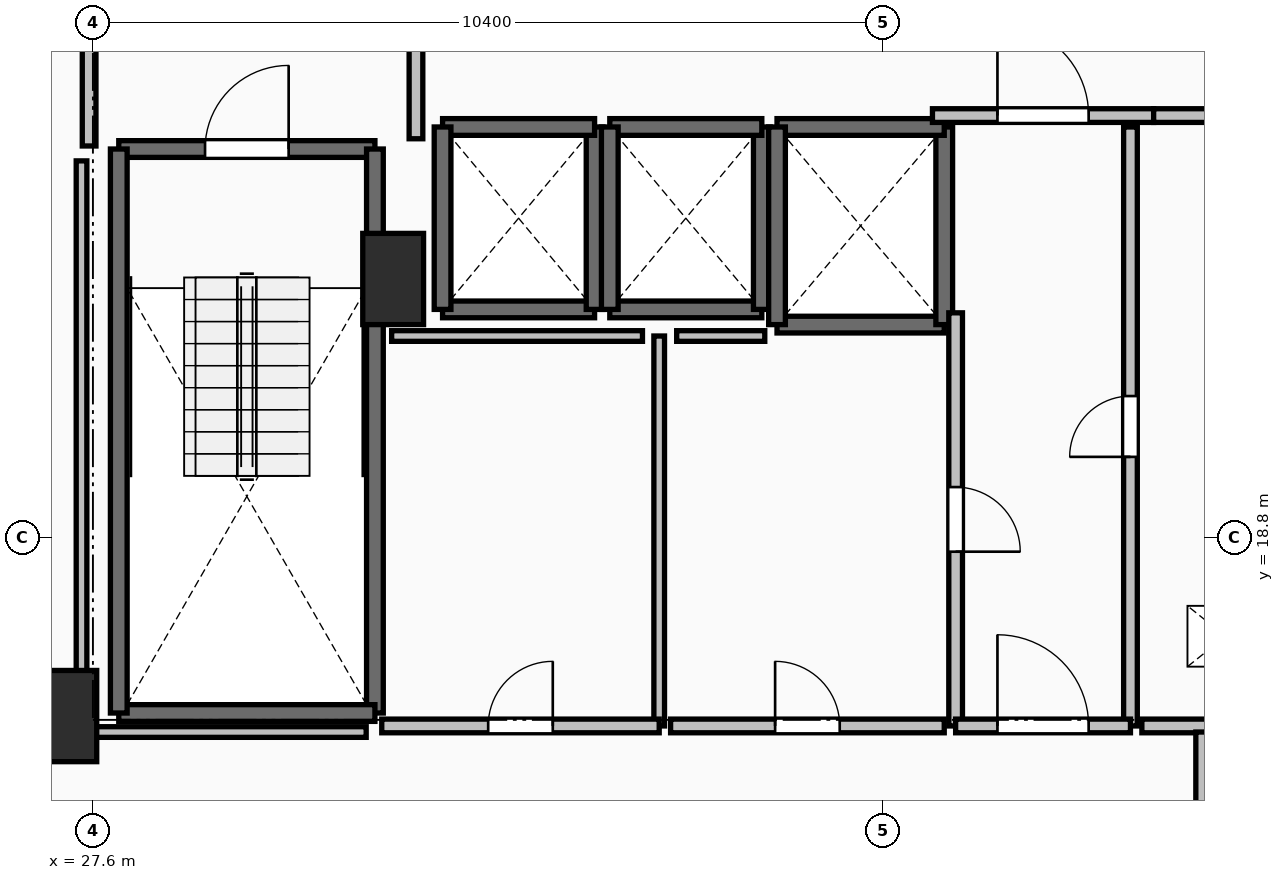
"""IFC4 building model, lengths in metres.
Left out: names, types, materials, properties, quantities, classifications, styles, units other than length and angle.
Written with IfcOpenShell. Run it as: python <this file> out.ifc"""

import sys

from ifc_helpers import new_model, si_unit, direction, frame, frame_2d, origin, origin_2d, place, context, subcontext, project, spatial, rectangle, extrude, element, fill, save


model = new_model("IFC4")
c1 = context("Model", 3, precision=1e-05, world=origin(), true_north=direction((0.0, 1.0)))
c2 = subcontext(c1, "Body", "Model", "MODEL_VIEW")
j1 = project(units=[si_unit("LENGTHUNIT", "METRE"), si_unit("PLANEANGLEUNIT", "RADIAN")], contexts=[c1])
p1 = place(None, origin())
s1 = spatial("IfcSite", under=j1, at=p1, CompositionType="ELEMENT")
p2 = place(p1, origin())
s2 = spatial("IfcBuilding", under=s1, at=p2, CompositionType="ELEMENT")
p3 = place(p2, frame((0.0, 0.0, 55.5)))
s3 = spatial("IfcBuildingStorey", under=s2, at=p3, CompositionType="ELEMENT", Elevation=55.5)
for number, where, z_axis, x_axis in (
    (1, (27.25, 16.45, 0.0), (0.0, 0.0, 1.0), (1.0, 0.0, 0.0)),
    (2, (31.55, 22.2, 0.0), (0.0, 0.0, 1.0), (1.0, 0.0, 0.0)),
):
    element("IfcColumn", number, at=place(p3, frame(where, z_axis=z_axis, x_axis=x_axis)), inside=s3, PredefinedType="PILASTER", context=c2, shape_type="SweptSolid", body=[
        extrude(rectangle(XDim=0.8, YDim=1.2, at=origin_2d()), origin(), (0.0, 0.0, 1.0), 3.5),
    ])
p4 = place(p3, frame((27.94, 23.91, 0.0), z_axis=(0.0, 0.0, 1.0), x_axis=(1.0, 0.0, 0.0)))
e3 = element("IfcWall", 3, at=p4, inside=s3, PredefinedType="SOLIDWALL", context=c2, shape_type="SweptSolid", body=[
    extrude(rectangle(XDim=3.37, YDim=0.22, at=frame_2d((1.685, 0.0))), origin(), (0.0, 0.0, 1.0), 3.24),
])
p5 = place(p4, frame((1.135, 0.0, 0.0)))
e4 = element("IfcOpeningElement", 4, at=p5, cuts=e3, PredefinedType="OPENING", context=c2, shape_type="SweptSolid", body=[
    extrude(rectangle(XDim=1.1, YDim=2.15, at=frame_2d((0.55, 1.075))), frame((0.0, 0.125, 0.0), z_axis=(0.0, -1.0, 0.0), x_axis=(1.0, 0.0, 0.0)), (0.0, 0.0, 1.0), 0.25),
])
p6 = place(p3, frame((31.31, 23.91, 0.0), z_axis=(0.0, 0.0, 1.0), x_axis=(0.0, -1.0, 0.0)))
e5 = element("IfcWall", 5, at=p6, inside=s3, PredefinedType="SOLIDWALL", context=c2, shape_type="SweptSolid", body=[
    extrude(rectangle(XDim=7.42, YDim=0.22, at=frame_2d((3.71, 0.0))), origin(), (0.0, 0.0, 1.0), 3.24),
])
p7 = place(p3, frame((31.31, 16.49, 0.0), z_axis=(0.0, 0.0, 1.0), x_axis=(-1.0, 0.0, 0.0)))
e6 = element("IfcWall", 6, at=p7, inside=s3, PredefinedType="SOLIDWALL", context=c2, shape_type="SweptSolid", body=[
    extrude(rectangle(XDim=3.37, YDim=0.22, at=frame_2d((1.685, 0.0))), origin(), (0.0, 0.0, 1.0), 3.24),
])
p8 = place(p3, frame((27.94, 16.49, 0.0), z_axis=(0.0, 0.0, 1.0), x_axis=(0.0, 1.0, 0.0)))
e7 = element("IfcWall", 7, at=p8, inside=s3, PredefinedType="SOLIDWALL", context=c2, shape_type="SweptSolid", body=[
    extrude(rectangle(XDim=7.42, YDim=0.22, at=frame_2d((3.71, 0.0))), origin(), (0.0, 0.0, 1.0), 3.24),
])
p9 = place(p3, frame((32.2, 21.8, 0.0), z_axis=(0.0, 0.0, 1.0), x_axis=(1.0, 0.0, 0.0)))
e8 = element("IfcWall", 8, at=p9, inside=s3, PredefinedType="SOLIDWALL", context=c2, shape_type="SweptSolid", body=[
    extrude(rectangle(XDim=2.0, YDim=0.22, at=frame_2d((1.0, 0.0))), origin(), (0.0, 0.0, 1.0), 3.24),
])
p10 = place(p3, frame((34.2, 21.8, 0.0), z_axis=(0.0, 0.0, 1.0), x_axis=(0.0, 1.0, 0.0)))
e9 = element("IfcWall", 9, at=p10, inside=s3, PredefinedType="SOLIDWALL", context=c2, shape_type="SweptSolid", body=[
    extrude(rectangle(XDim=2.4, YDim=0.22, at=frame_2d((1.2, 0.0))), origin(), (0.0, 0.0, 1.0), 3.24),
])
p11 = place(p3, frame((34.2, 24.2, 0.0), z_axis=(0.0, 0.0, 1.0), x_axis=(-1.0, 0.0, 0.0)))
e10 = element("IfcWall", 10, at=p11, inside=s3, PredefinedType="SOLIDWALL", context=c2, shape_type="SweptSolid", body=[
    extrude(rectangle(XDim=2.0, YDim=0.22, at=frame_2d((1.0, 0.0))), origin(), (0.0, 0.0, 1.0), 3.24),
])
p12 = place(p3, frame((32.2, 24.2, 0.0), z_axis=(0.0, 0.0, 1.0), x_axis=(0.0, -1.0, 0.0)))
e11 = element("IfcWall", 11, at=p12, inside=s3, PredefinedType="SOLIDWALL", context=c2, shape_type="SweptSolid", body=[
    extrude(rectangle(XDim=2.4, YDim=0.22, at=frame_2d((1.2, 0.0))), origin(), (0.0, 0.0, 1.0), 3.24),
])
p13 = place(p3, frame((34.4, 21.8, 0.0), z_axis=(0.0, 0.0, 1.0), x_axis=(1.0, 0.0, 0.0)))
e12 = element("IfcWall", 12, at=p13, inside=s3, PredefinedType="SOLIDWALL", context=c2, shape_type="SweptSolid", body=[
    extrude(rectangle(XDim=2.0, YDim=0.22, at=frame_2d((1.0, 0.0))), origin(), (0.0, 0.0, 1.0), 3.24),
])
p14 = place(p3, frame((36.4, 21.8, 0.0), z_axis=(0.0, 0.0, 1.0), x_axis=(0.0, 1.0, 0.0)))
e13 = element("IfcWall", 13, at=p14, inside=s3, PredefinedType="SOLIDWALL", context=c2, shape_type="SweptSolid", body=[
    extrude(rectangle(XDim=2.4, YDim=0.22, at=frame_2d((1.2, 0.0))), origin(), (0.0, 0.0, 1.0), 3.24),
])
p15 = place(p3, frame((36.4, 24.2, 0.0), z_axis=(0.0, 0.0, 1.0), x_axis=(-1.0, 0.0, 0.0)))
e14 = element("IfcWall", 14, at=p15, inside=s3, PredefinedType="SOLIDWALL", context=c2, shape_type="SweptSolid", body=[
    extrude(rectangle(XDim=2.0, YDim=0.22, at=frame_2d((1.0, 0.0))), origin(), (0.0, 0.0, 1.0), 3.24),
])
p16 = place(p3, frame((34.4, 24.2, 0.0), z_axis=(0.0, 0.0, 1.0), x_axis=(0.0, -1.0, 0.0)))
e15 = element("IfcWall", 15, at=p16, inside=s3, PredefinedType="SOLIDWALL", context=c2, shape_type="SweptSolid", body=[
    extrude(rectangle(XDim=2.4, YDim=0.22, at=frame_2d((1.2, 0.0))), origin(), (0.0, 0.0, 1.0), 3.24),
])
p17 = place(p3, frame((36.6, 21.6, 0.0), z_axis=(0.0, 0.0, 1.0), x_axis=(1.0, 0.0, 0.0)))
e16 = element("IfcWall", 16, at=p17, inside=s3, PredefinedType="SOLIDWALL", context=c2, shape_type="SweptSolid", body=[
    extrude(rectangle(XDim=2.2, YDim=0.22, at=frame_2d((1.1, 0.0))), origin(), (0.0, 0.0, 1.0), 3.24),
])
p18 = place(p3, frame((38.8, 21.6, 0.0), z_axis=(0.0, 0.0, 1.0), x_axis=(0.0, 1.0, 0.0)))
e17 = element("IfcWall", 17, at=p18, inside=s3, PredefinedType="SOLIDWALL", context=c2, shape_type="SweptSolid", body=[
    extrude(rectangle(XDim=2.6, YDim=0.22, at=frame_2d((1.3, 0.0))), origin(), (0.0, 0.0, 1.0), 3.24),
])
p19 = place(p3, frame((38.8, 24.2, 0.0), z_axis=(0.0, 0.0, 1.0), x_axis=(-1.0, 0.0, 0.0)))
e18 = element("IfcWall", 18, at=p19, inside=s3, PredefinedType="SOLIDWALL", context=c2, shape_type="SweptSolid", body=[
    extrude(rectangle(XDim=2.2, YDim=0.22, at=frame_2d((1.1, 0.0))), origin(), (0.0, 0.0, 1.0), 3.24),
])
p20 = place(p3, frame((36.6, 24.2, 0.0), z_axis=(0.0, 0.0, 1.0), x_axis=(0.0, -1.0, 0.0)))
e19 = element("IfcWall", 19, at=p20, inside=s3, PredefinedType="SOLIDWALL", context=c2, shape_type="SweptSolid", body=[
    extrude(rectangle(XDim=2.6, YDim=0.22, at=frame_2d((1.3, 0.0))), origin(), (0.0, 0.0, 1.0), 3.24),
])
p21 = place(p3, frame((31.85, 24.045, 0.0), z_axis=(0.0, 0.0, 1.0), x_axis=(0.0, 1.0, 0.0)))
e20 = element("IfcWall", 20, at=p21, inside=s3, PredefinedType="PARTITIONING", context=c2, shape_type="SweptSolid", body=[
    extrude(rectangle(XDim=3.91, YDim=0.18, at=frame_2d((1.955, 0.0))), origin(), (0.0, 0.0, 1.0), 3.24),
])
p22 = place(p21, frame((1.355, 0.0, 0.0)))
e21 = element("IfcOpeningElement", 21, at=p22, cuts=e20, PredefinedType="OPENING", context=c2, shape_type="SweptSolid", body=[
    extrude(rectangle(XDim=1.2, YDim=2.15, at=frame_2d((0.6, 1.075))), frame((0.0, 0.105, 0.0), z_axis=(0.0, -1.0, 0.0), x_axis=(1.0, 0.0, 0.0)), (0.0, 0.0, 1.0), 0.21),
])
p23 = place(p3, frame((27.55, 28.0, 0.0), z_axis=(0.0, 0.0, 1.0), x_axis=(0.0, -1.0, 0.0)))
e22 = element("IfcWall", 22, at=p23, inside=s3, PredefinedType="PARTITIONING", context=c2, shape_type="SweptSolid", body=[
    extrude(rectangle(XDim=4.05, YDim=0.18, at=frame_2d((2.025, 0.0))), origin(), (0.0, 0.0, 1.0), 3.24),
])
p24 = place(p23, frame((1.425, 0.0, 0.0)))
e23 = element("IfcOpeningElement", 23, at=p24, cuts=e22, PredefinedType="OPENING", context=c2, shape_type="SweptSolid", body=[
    extrude(rectangle(XDim=1.2, YDim=2.15, at=frame_2d((0.6, 1.075))), frame((0.0, 0.105, 0.0), z_axis=(0.0, -1.0, 0.0), x_axis=(1.0, 0.0, 0.0)), (0.0, 0.0, 1.0), 0.21),
])
p25 = place(p3, frame((38.645, 24.35, 0.0), z_axis=(0.0, 0.0, 1.0), x_axis=(1.0, 0.0, 0.0)))
e24 = element("IfcWall", 24, at=p25, inside=s3, PredefinedType="PARTITIONING", context=c2, shape_type="SweptSolid", body=[
    extrude(rectangle(XDim=2.91, YDim=0.18, at=frame_2d((1.455, 0.0))), origin(), (0.0, 0.0, 1.0), 3.24),
])
p26 = place(p25, frame((0.855, 0.0, 0.0)))
e25 = element("IfcOpeningElement", 25, at=p26, cuts=e24, PredefinedType="OPENING", context=c2, shape_type="SweptSolid", body=[
    extrude(rectangle(XDim=1.2, YDim=2.15, at=frame_2d((0.6, 1.075))), frame((0.0, 0.105, 0.0), z_axis=(0.0, -1.0, 0.0), x_axis=(1.0, 0.0, 0.0)), (0.0, 0.0, 1.0), 0.21),
])
p27 = place(p3, frame((41.555, 24.35, 0.0), z_axis=(0.0, 0.0, 1.0), x_axis=(1.0, 0.0, 0.0)))
e26 = element("IfcWall", 26, at=p27, inside=s3, PredefinedType="PARTITIONING", context=c2, shape_type="SweptSolid", body=[
    extrude(rectangle(XDim=2.445, YDim=0.18, at=frame_2d((1.223, 0.0))), origin(), (0.0, 0.0, 1.0), 3.24),
])
p28 = place(p27, frame((0.823, 0.0, 0.0)))
e27 = element("IfcOpeningElement", 27, at=p28, cuts=e26, PredefinedType="OPENING", context=c2, shape_type="SweptSolid", body=[
    extrude(rectangle(XDim=0.8, YDim=2.05, at=frame_2d((0.4, 1.025))), frame((0.0, 0.105, 0.0), z_axis=(0.0, -1.0, 0.0), x_axis=(1.0, 0.0, 0.0)), (0.0, 0.0, 1.0), 0.21),
])
p29 = place(p3, frame((41.25, 16.32, 0.0), z_axis=(0.0, 0.0, 1.0), x_axis=(0.0, 1.0, 0.0)))
e28 = element("IfcWall", 28, at=p29, inside=s3, PredefinedType="PARTITIONING", context=c2, shape_type="SweptSolid", body=[
    extrude(rectangle(XDim=7.88, YDim=0.18, at=frame_2d((3.94, 0.0))), origin(), (0.0, 0.0, 1.0), 3.24),
])
p30 = place(p29, frame((3.54, 0.0, 0.0)))
e29 = element("IfcOpeningElement", 29, at=p30, cuts=e28, PredefinedType="OPENING", context=c2, shape_type="SweptSolid", body=[
    extrude(rectangle(XDim=0.8, YDim=2.05, at=frame_2d((0.4, 1.025))), frame((0.0, 0.105, 0.0), z_axis=(0.0, -1.0, 0.0), x_axis=(1.0, 0.0, 0.0)), (0.0, 0.0, 1.0), 0.21),
])
p31 = place(p3, frame((38.95, 21.755, 0.0), z_axis=(0.0, 0.0, 1.0), x_axis=(0.0, -1.0, 0.0)))
e30 = element("IfcWall", 30, at=p31, inside=s3, PredefinedType="PARTITIONING", context=c2, shape_type="SweptSolid", body=[
    extrude(rectangle(XDim=5.435, YDim=0.18, at=frame_2d((2.717, 0.0))), origin(), (0.0, 0.0, 1.0), 3.24),
])
p32 = place(p31, frame((2.292, 0.0, 0.0)))
e31 = element("IfcOpeningElement", 31, at=p32, cuts=e30, PredefinedType="OPENING", context=c2, shape_type="SweptSolid", body=[
    extrude(rectangle(XDim=0.85, YDim=2.1, at=frame_2d((0.425, 1.05))), frame((0.0, 0.105, 0.0), z_axis=(0.0, -1.0, 0.0), x_axis=(1.0, 0.0, 0.0)), (0.0, 0.0, 1.0), 0.21),
])
p33 = place(p3, frame((38.95, 16.32, 0.0), z_axis=(0.0, 0.0, 1.0), x_axis=(1.0, 0.0, 0.0)))
e32 = element("IfcWall", 32, at=p33, inside=s3, PredefinedType="PARTITIONING", context=c2, shape_type="SweptSolid", body=[
    extrude(rectangle(XDim=2.3, YDim=0.18, at=frame_2d((1.15, 0.0))), origin(), (0.0, 0.0, 1.0), 3.24),
])
p34 = place(p33, frame((0.55, 0.0, 0.0)))
e33 = element("IfcOpeningElement", 33, at=p34, cuts=e32, PredefinedType="OPENING", context=c2, shape_type="SweptSolid", body=[
    extrude(rectangle(XDim=1.2, YDim=2.15, at=frame_2d((0.6, 1.075))), frame((0.0, 0.105, 0.0), z_axis=(0.0, -1.0, 0.0), x_axis=(1.0, 0.0, 0.0)), (0.0, 0.0, 1.0), 0.21),
])
p35 = place(p3, frame((41.4, 16.32, 0.0), z_axis=(0.0, 0.0, 1.0), x_axis=(1.0, 0.0, 0.0)))
e34 = element("IfcWall", 34, at=p35, inside=s3, PredefinedType="PARTITIONING", context=c2, shape_type="SweptSolid", body=[
    extrude(rectangle(XDim=3.2, YDim=0.18, at=frame_2d((1.6, 0.0))), origin(), (0.0, 0.0, 1.0), 3.24),
])
p36 = place(p35, frame((1.2, 0.0, 0.0)))
e35 = element("IfcOpeningElement", 35, at=p36, cuts=e34, PredefinedType="OPENING", context=c2, shape_type="SweptSolid", body=[
    extrude(rectangle(XDim=0.8, YDim=2.05, at=frame_2d((0.4, 1.025))), frame((0.0, 0.105, 0.0), z_axis=(0.0, -1.0, 0.0), x_axis=(1.0, 0.0, 0.0)), (0.0, 0.0, 1.0), 0.21),
])
p37 = place(p3, frame((35.05, 16.32, 0.0), z_axis=(0.0, 0.0, 1.0), x_axis=(0.0, 1.0, 0.0)))
e36 = element("IfcWall", 36, at=p37, inside=s3, PredefinedType="PARTITIONING", context=c2, shape_type="SweptSolid", body=[
    extrude(rectangle(XDim=5.13, YDim=0.14, at=frame_2d((2.565, 0.0))), origin(), (0.0, 0.0, 1.0), 3.24),
])
p38 = place(p3, frame((31.4, 16.32, 0.0), z_axis=(0.0, 0.0, 1.0), x_axis=(1.0, 0.0, 0.0)))
e37 = element("IfcWall", 37, at=p38, inside=s3, PredefinedType="PARTITIONING", context=c2, shape_type="SweptSolid", body=[
    extrude(rectangle(XDim=3.65, YDim=0.18, at=frame_2d((1.825, 0.0))), origin(), (0.0, 0.0, 1.0), 3.24),
])
p39 = place(p38, frame((1.4, 0.0, 0.0)))
e38 = element("IfcOpeningElement", 38, at=p39, cuts=e37, PredefinedType="OPENING", context=c2, shape_type="SweptSolid", body=[
    extrude(rectangle(XDim=0.85, YDim=2.1, at=frame_2d((0.425, 1.05))), frame((0.0, 0.105, 0.0), z_axis=(0.0, -1.0, 0.0), x_axis=(1.0, 0.0, 0.0)), (0.0, 0.0, 1.0), 0.21),
])
p40 = place(p3, frame((35.2, 16.32, 0.0), z_axis=(0.0, 0.0, 1.0), x_axis=(1.0, 0.0, 0.0)))
e39 = element("IfcWall", 39, at=p40, inside=s3, PredefinedType="PARTITIONING", context=c2, shape_type="SweptSolid", body=[
    extrude(rectangle(XDim=3.6, YDim=0.18, at=frame_2d((1.8, 0.0))), origin(), (0.0, 0.0, 1.0), 3.24),
])
p41 = place(p40, frame((1.375, 0.0, 0.0)))
e40 = element("IfcOpeningElement", 40, at=p41, cuts=e39, PredefinedType="OPENING", context=c2, shape_type="SweptSolid", body=[
    extrude(rectangle(XDim=0.85, YDim=2.1, at=frame_2d((0.425, 1.05))), frame((0.0, 0.105, 0.0), z_axis=(0.0, -1.0, 0.0), x_axis=(1.0, 0.0, 0.0)), (0.0, 0.0, 1.0), 0.21),
])
p42 = place(p3, frame((42.2, 14.1, 0.0), z_axis=(0.0, 0.0, 1.0), x_axis=(0.0, 1.0, 0.0)))
e41 = element("IfcWall", 41, at=p42, inside=s3, PredefinedType="PARTITIONING", context=c2, shape_type="SweptSolid", body=[
    extrude(rectangle(XDim=2.14, YDim=0.18, at=frame_2d((1.07, 0.0))), origin(), (0.0, 0.0, 1.0), 3.24),
])
p43 = place(p3, frame((34.83, 21.45, 0.0), z_axis=(0.0, 0.0, 1.0), x_axis=(-1.0, 0.0, 0.0)))
e42 = element("IfcWall", 42, at=p43, inside=s3, PredefinedType="PARTITIONING", context=c2, shape_type="SweptSolid", body=[
    extrude(rectangle(XDim=3.3, YDim=0.14, at=frame_2d((1.65, 0.0))), origin(), (0.0, 0.0, 1.0), 3.24),
])
p44 = place(p3, frame((36.439, 21.45, 0.0), z_axis=(0.0, 0.0, 1.0), x_axis=(-1.0, 0.0, 0.0)))
e43 = element("IfcWall", 43, at=p44, inside=s3, PredefinedType="PARTITIONING", context=c2, shape_type="SweptSolid", body=[
    extrude(rectangle(XDim=1.159, YDim=0.14, at=frame_2d((0.58, 0.0))), origin(), (0.0, 0.0, 1.0), 3.24),
])
p45 = place(p3, frame((31.195, 16.24, 0.0), z_axis=(0.0, 0.0, 1.0), x_axis=(-1.0, 0.0, 0.0)))
e44 = element("IfcWall", 44, at=p45, inside=s3, PredefinedType="PARTITIONING", context=c2, shape_type="SweptSolid", body=[
    extrude(rectangle(XDim=3.745, YDim=0.14, at=frame_2d((1.873, 0.0))), origin(), (0.0, 0.0, 1.0), 2.432),
])
p46 = place(p3, frame((27.45, 16.24, 0.0), z_axis=(0.0, 0.0, 1.0), x_axis=(0.0, 1.0, 0.0)))
e45 = element("IfcWall", 45, at=p46, inside=s3, PredefinedType="PARTITIONING", context=c2, shape_type="SweptSolid", body=[
    extrude(rectangle(XDim=7.514, YDim=0.14, at=frame_2d((3.757, 0.0))), origin(), (0.0, 0.0, 1.0), 2.432),
])
p47 = place(p5, origin())
e46 = element("IfcDoor", 46, at=p47, inside=s3, OperationType="SINGLE_SWING_RIGHT", PredefinedType="DOOR", context=c2, shape_type="SweptSolid", body=[
    extrude(rectangle(XDim=1.1, YDim=2.15, at=frame_2d((0.55, 1.075))), frame((0.0, 0.025, 0.0), z_axis=(0.0, -1.0, 0.0), x_axis=(1.0, 0.0, 0.0)), (0.0, 0.0, 1.0), 0.05),
])
fill(e4, e46)
p48 = place(p26, origin())
e47 = element("IfcDoor", 47, at=p48, inside=s3, OperationType="SINGLE_SWING_LEFT", PredefinedType="DOOR", context=c2, shape_type="SweptSolid", body=[
    extrude(rectangle(XDim=1.2, YDim=2.15, at=frame_2d((0.6, 1.075))), frame((0.0, 0.025, 0.0), z_axis=(0.0, -1.0, 0.0), x_axis=(1.0, 0.0, 0.0)), (0.0, 0.0, 1.0), 0.05),
])
fill(e25, e47)
p49 = place(p30, origin())
e48 = element("IfcDoor", 48, at=p49, inside=s3, OperationType="SINGLE_SWING_LEFT", PredefinedType="DOOR", context=c2, shape_type="SweptSolid", body=[
    extrude(rectangle(XDim=0.8, YDim=2.05, at=frame_2d((0.4, 1.025))), frame((0.0, 0.025, 0.0), z_axis=(0.0, -1.0, 0.0), x_axis=(1.0, 0.0, 0.0)), (0.0, 0.0, 1.0), 0.05),
])
fill(e29, e48)
p50 = place(p32, origin())
e49 = element("IfcDoor", 49, at=p50, inside=s3, OperationType="SINGLE_SWING_RIGHT", PredefinedType="DOOR", context=c2, shape_type="SweptSolid", body=[
    extrude(rectangle(XDim=0.85, YDim=2.1, at=frame_2d((0.425, 1.05))), frame((0.0, 0.025, 0.0), z_axis=(0.0, -1.0, 0.0), x_axis=(1.0, 0.0, 0.0)), (0.0, 0.0, 1.0), 0.05),
])
fill(e31, e49)
p51 = place(p34, origin())
e50 = element("IfcDoor", 50, at=p51, inside=s3, OperationType="SINGLE_SWING_LEFT", PredefinedType="DOOR", context=c2, shape_type="SweptSolid", body=[
    extrude(rectangle(XDim=1.2, YDim=2.15, at=frame_2d((0.6, 1.075))), frame((0.0, 0.025, 0.0), z_axis=(0.0, -1.0, 0.0), x_axis=(1.0, 0.0, 0.0)), (0.0, 0.0, 1.0), 0.05),
])
fill(e33, e50)
p52 = place(p39, origin())
e51 = element("IfcDoor", 51, at=p52, inside=s3, OperationType="SINGLE_SWING_RIGHT", PredefinedType="DOOR", context=c2, shape_type="SweptSolid", body=[
    extrude(rectangle(XDim=0.85, YDim=2.1, at=frame_2d((0.425, 1.05))), frame((0.0, 0.025, 0.0), z_axis=(0.0, -1.0, 0.0), x_axis=(1.0, 0.0, 0.0)), (0.0, 0.0, 1.0), 0.05),
])
fill(e38, e51)
p53 = place(p41, origin())
e52 = element("IfcDoor", 52, at=p53, inside=s3, OperationType="SINGLE_SWING_LEFT", PredefinedType="DOOR", context=c2, shape_type="SweptSolid", body=[
    extrude(rectangle(XDim=0.85, YDim=2.1, at=frame_2d((0.425, 1.05))), frame((0.0, 0.025, 0.0), z_axis=(0.0, -1.0, 0.0), x_axis=(1.0, 0.0, 0.0)), (0.0, 0.0, 1.0), 0.05),
])
fill(e40, e52)
save(model, sys.argv[1])
